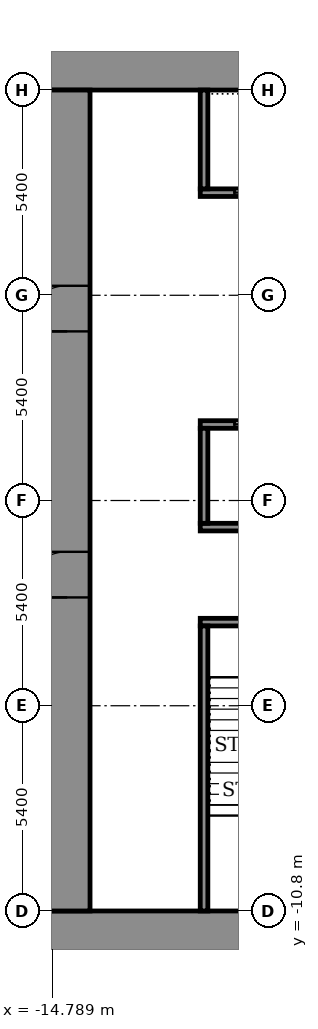
"""IFC4 building model, lengths in metres.
Left out: names, types, materials, properties, quantities, classifications, styles, units other than length and angle.
Written with IfcOpenShell. Run it as: python <this file> out.ifc"""

import sys

from ifc_helpers import new_model, si_unit, direction, frame, frame_2d, origin, place, context, subcontext, project, spatial, rectangle, extrude, element, fill, save


model = new_model("IFC4")
c1 = context("Model", 3, precision=1e-05, world=origin(), true_north=direction((0.0, 1.0)))
c2 = subcontext(c1, "Body", "Model", "MODEL_VIEW")
j1 = project(units=[si_unit("LENGTHUNIT", "METRE"), si_unit("PLANEANGLEUNIT", "RADIAN")], contexts=[c1])
p1 = place(None, origin())
s1 = spatial("IfcSite", under=j1, at=p1, CompositionType="ELEMENT")
p2 = place(p1, origin())
s2 = spatial("IfcBuilding", under=s1, at=p2, CompositionType="ELEMENT")
p3 = place(p2, frame((0.0, 0.0, 20.5)))
s3 = spatial("IfcBuildingStorey", under=s2, at=p3, CompositionType="ELEMENT", Elevation=20.5)
for number, where, z_axis, x_axis in (
    (1, (-15.0, -11.4, 0.0), (0.0, 0.0, 1.0), (1.0, 0.0, 0.0)),
    (2, (-15.0, 11.4, 0.0), (0.0, 0.0, 1.0), (1.0, 0.0, 0.0)),
):
    element("IfcWall", number, at=place(p3, frame(where, z_axis=z_axis, x_axis=x_axis)), inside=s3, PredefinedType="SHEAR", context=c2, shape_type="SweptSolid", body=[
        extrude(rectangle(XDim=30.0, YDim=1.2, at=frame_2d((15.0, 0.0))), origin(), (0.0, 0.0, 1.0), 4.5),
    ])
p4 = place(p3, frame((-14.4, -10.8, 0.0), z_axis=(0.0, 0.0, 1.0), x_axis=(0.0, 1.0, 0.0)))
e3 = element("IfcWall", 3, at=p4, inside=s3, PredefinedType="SHEAR", context=c2, shape_type="SweptSolid", body=[
    extrude(rectangle(XDim=21.6, YDim=1.2, at=frame_2d((10.8, 0.0))), origin(), (0.0, 0.0, 1.0), 4.5),
])
p5 = place(p4, frame((8.25, 0.0, 0.0)))
e4 = element("IfcOpeningElement", 4, at=p5, cuts=e3, PredefinedType="OPENING", context=c2, shape_type="SweptSolid", body=[
    extrude(rectangle(XDim=1.2, YDim=2.1, at=frame_2d((0.6, 1.05))), frame((0.0, 0.61, 0.0), z_axis=(0.0, -1.0, 0.0), x_axis=(1.0, 0.0, 0.0)), (0.0, 0.0, 1.0), 1.22),
])
p6 = place(p4, frame((15.25, 0.0, 0.0)))
e5 = element("IfcOpeningElement", 5, at=p6, cuts=e3, PredefinedType="OPENING", context=c2, shape_type="SweptSolid", body=[
    extrude(rectangle(XDim=1.2, YDim=2.1, at=frame_2d((0.6, 1.05))), frame((0.0, 0.61, 0.0), z_axis=(0.0, -1.0, 0.0), x_axis=(1.0, 0.0, 0.0)), (0.0, 0.0, 1.0), 1.22),
])
p7 = place(p3, frame((-10.9, -3.2, 0.0), z_axis=(0.0, 0.0, 1.0), x_axis=(1.0, 0.0, 0.0)))
e6 = element("IfcWall", 6, at=p7, inside=s3, PredefinedType="SHEAR", context=c2, shape_type="SweptSolid", body=[
    extrude(rectangle(XDim=21.8, YDim=0.2, at=frame_2d((10.9, 0.0))), origin(), (0.0, 0.0, 1.0), 3.95),
])
p8 = place(p7, frame((1.075, 0.0, 0.0)))
e7 = element("IfcOpeningElement", 7, at=p8, cuts=e6, PredefinedType="OPENING", context=c2, shape_type="SweptSolid", body=[
    extrude(rectangle(XDim=1.1, YDim=2.1, at=frame_2d((0.55, 1.05))), frame((0.0, 0.11, 0.0), z_axis=(0.0, -1.0, 0.0), x_axis=(1.0, 0.0, 0.0)), (0.0, 0.0, 1.0), 0.22),
])
p9 = place(p7, frame((10.325, 0.0, 0.0)))
e8 = element("IfcOpeningElement", 8, at=p9, cuts=e6, PredefinedType="OPENING", context=c2, shape_type="SweptSolid", body=[
    extrude(rectangle(XDim=1.1, YDim=2.1, at=frame_2d((0.55, 1.05))), frame((0.0, 0.11, 0.0), z_axis=(0.0, -1.0, 0.0), x_axis=(1.0, 0.0, 0.0)), (0.0, 0.0, 1.0), 0.22),
])
p10 = place(p7, frame((19.625, 0.0, 0.0)))
e9 = element("IfcOpeningElement", 9, at=p10, cuts=e6, PredefinedType="OPENING", context=c2, shape_type="SweptSolid", body=[
    extrude(rectangle(XDim=1.1, YDim=2.1, at=frame_2d((0.55, 1.05))), frame((0.0, 0.11, 0.0), z_axis=(0.0, -1.0, 0.0), x_axis=(1.0, 0.0, 0.0)), (0.0, 0.0, 1.0), 0.22),
])
p11 = place(p7, frame((5.7, 0.0, 0.0)))
e10 = element("IfcOpeningElement", 10, at=p11, cuts=e6, PredefinedType="OPENING", context=c2, shape_type="SweptSolid", body=[
    extrude(rectangle(XDim=1.1, YDim=2.1, at=frame_2d((0.55, 1.05))), frame((0.0, 0.11, 0.0), z_axis=(0.0, -1.0, 0.0), x_axis=(1.0, 0.0, 0.0)), (0.0, 0.0, 1.0), 0.22),
])
p12 = place(p7, frame((14.975, 0.0, 0.0)))
e11 = element("IfcOpeningElement", 11, at=p12, cuts=e6, PredefinedType="OPENING", context=c2, shape_type="SweptSolid", body=[
    extrude(rectangle(XDim=1.1, YDim=2.1, at=frame_2d((0.55, 1.05))), frame((0.0, 0.11, 0.0), z_axis=(0.0, -1.0, 0.0), x_axis=(1.0, 0.0, 0.0)), (0.0, 0.0, 1.0), 0.22),
])
p13 = place(p3, frame((-10.9, -0.7, 0.0), z_axis=(0.0, 0.0, 1.0), x_axis=(1.0, 0.0, 0.0)))
e12 = element("IfcWall", 12, at=p13, inside=s3, PredefinedType="SHEAR", context=c2, shape_type="SweptSolid", body=[
    extrude(rectangle(XDim=21.8, YDim=0.2, at=frame_2d((10.9, 0.0))), origin(), (0.0, 0.0, 1.0), 3.95),
])
p14 = place(p3, frame((-10.9, 2.0, 0.0), z_axis=(0.0, 0.0, 1.0), x_axis=(1.0, 0.0, 0.0)))
e13 = element("IfcWall", 13, at=p14, inside=s3, PredefinedType="SHEAR", context=c2, shape_type="SweptSolid", body=[
    extrude(rectangle(XDim=21.8, YDim=0.2, at=frame_2d((10.9, 0.0))), origin(), (0.0, 0.0, 1.0), 3.95),
])
p15 = place(p14, frame((0.9, 0.0, 0.0)))
e14 = element("IfcOpeningElement", 14, at=p15, cuts=e13, PredefinedType="OPENING", context=c2, shape_type="SweptSolid", body=[
    extrude(rectangle(XDim=1.1, YDim=2.1, at=frame_2d((0.55, 1.05))), frame((0.0, 0.11, 0.0), z_axis=(0.0, -1.0, 0.0), x_axis=(1.0, 0.0, 0.0)), (0.0, 0.0, 1.0), 0.22),
])
p16 = place(p14, frame((3.6, 0.0, 0.0)))
e15 = element("IfcOpeningElement", 15, at=p16, cuts=e13, PredefinedType="OPENING", context=c2, shape_type="SweptSolid", body=[
    extrude(rectangle(XDim=1.1, YDim=2.1, at=frame_2d((0.55, 1.05))), frame((0.0, 0.11, 0.0), z_axis=(0.0, -1.0, 0.0), x_axis=(1.0, 0.0, 0.0)), (0.0, 0.0, 1.0), 0.22),
])
p17 = place(p14, frame((6.3, 0.0, 0.0)))
e16 = element("IfcOpeningElement", 16, at=p17, cuts=e13, PredefinedType="OPENING", context=c2, shape_type="SweptSolid", body=[
    extrude(rectangle(XDim=1.1, YDim=2.1, at=frame_2d((0.55, 1.05))), frame((0.0, 0.11, 0.0), z_axis=(0.0, -1.0, 0.0), x_axis=(1.0, 0.0, 0.0)), (0.0, 0.0, 1.0), 0.22),
])
p18 = place(p14, frame((9.0, 0.0, 0.0)))
e17 = element("IfcOpeningElement", 17, at=p18, cuts=e13, PredefinedType="OPENING", context=c2, shape_type="SweptSolid", body=[
    extrude(rectangle(XDim=1.1, YDim=2.1, at=frame_2d((0.55, 1.05))), frame((0.0, 0.11, 0.0), z_axis=(0.0, -1.0, 0.0), x_axis=(1.0, 0.0, 0.0)), (0.0, 0.0, 1.0), 0.22),
])
p19 = place(p14, frame((11.7, 0.0, 0.0)))
e18 = element("IfcOpeningElement", 18, at=p19, cuts=e13, PredefinedType="OPENING", context=c2, shape_type="SweptSolid", body=[
    extrude(rectangle(XDim=1.1, YDim=2.1, at=frame_2d((0.55, 1.05))), frame((0.0, 0.11, 0.0), z_axis=(0.0, -1.0, 0.0), x_axis=(1.0, 0.0, 0.0)), (0.0, 0.0, 1.0), 0.22),
])
p20 = place(p14, frame((17.2, 0.0, 0.0)))
e19 = element("IfcOpeningElement", 19, at=p20, cuts=e13, PredefinedType="OPENING", context=c2, shape_type="SweptSolid", body=[
    extrude(rectangle(XDim=0.9, YDim=2.1, at=frame_2d((0.45, 1.05))), frame((0.0, 0.11, 0.0), z_axis=(0.0, -1.0, 0.0), x_axis=(1.0, 0.0, 0.0)), (0.0, 0.0, 1.0), 0.22),
])
p21 = place(p3, frame((-10.9, 8.1, 0.0), z_axis=(0.0, 0.0, 1.0), x_axis=(1.0, 0.0, 0.0)))
e20 = element("IfcWall", 20, at=p21, inside=s3, PredefinedType="SHEAR", context=c2, shape_type="SweptSolid", body=[
    extrude(rectangle(XDim=21.8, YDim=0.2, at=frame_2d((10.9, 0.0))), origin(), (0.0, 0.0, 1.0), 3.95),
])
p22 = place(p21, frame((0.9, 0.0, 0.0)))
e21 = element("IfcOpeningElement", 21, at=p22, cuts=e20, PredefinedType="OPENING", context=c2, shape_type="SweptSolid", body=[
    extrude(rectangle(XDim=1.1, YDim=2.1, at=frame_2d((0.55, 1.05))), frame((0.0, 0.11, 0.0), z_axis=(0.0, -1.0, 0.0), x_axis=(1.0, 0.0, 0.0)), (0.0, 0.0, 1.0), 0.22),
])
p23 = place(p21, frame((3.6, 0.0, 0.0)))
e22 = element("IfcOpeningElement", 22, at=p23, cuts=e20, PredefinedType="OPENING", context=c2, shape_type="SweptSolid", body=[
    extrude(rectangle(XDim=1.1, YDim=2.1, at=frame_2d((0.55, 1.05))), frame((0.0, 0.11, 0.0), z_axis=(0.0, -1.0, 0.0), x_axis=(1.0, 0.0, 0.0)), (0.0, 0.0, 1.0), 0.22),
])
p24 = place(p21, frame((6.3, 0.0, 0.0)))
e23 = element("IfcOpeningElement", 23, at=p24, cuts=e20, PredefinedType="OPENING", context=c2, shape_type="SweptSolid", body=[
    extrude(rectangle(XDim=1.1, YDim=2.1, at=frame_2d((0.55, 1.05))), frame((0.0, 0.11, 0.0), z_axis=(0.0, -1.0, 0.0), x_axis=(1.0, 0.0, 0.0)), (0.0, 0.0, 1.0), 0.22),
])
p25 = place(p21, frame((9.0, 0.0, 0.0)))
e24 = element("IfcOpeningElement", 24, at=p25, cuts=e20, PredefinedType="OPENING", context=c2, shape_type="SweptSolid", body=[
    extrude(rectangle(XDim=1.1, YDim=2.1, at=frame_2d((0.55, 1.05))), frame((0.0, 0.11, 0.0), z_axis=(0.0, -1.0, 0.0), x_axis=(1.0, 0.0, 0.0)), (0.0, 0.0, 1.0), 0.22),
])
p26 = place(p21, frame((11.7, 0.0, 0.0)))
e25 = element("IfcOpeningElement", 25, at=p26, cuts=e20, PredefinedType="OPENING", context=c2, shape_type="SweptSolid", body=[
    extrude(rectangle(XDim=1.1, YDim=2.1, at=frame_2d((0.55, 1.05))), frame((0.0, 0.11, 0.0), z_axis=(0.0, -1.0, 0.0), x_axis=(1.0, 0.0, 0.0)), (0.0, 0.0, 1.0), 0.22),
])
p27 = place(p21, frame((14.5, 0.0, 0.0)))
e26 = element("IfcOpeningElement", 26, at=p27, cuts=e20, PredefinedType="OPENING", context=c2, shape_type="SweptSolid", body=[
    extrude(rectangle(XDim=0.9, YDim=2.1, at=frame_2d((0.45, 1.05))), frame((0.0, 0.11, 0.0), z_axis=(0.0, -1.0, 0.0), x_axis=(1.0, 0.0, 0.0)), (0.0, 0.0, 1.0), 0.22),
])
p28 = place(p21, frame((18.55, 0.0, 0.0)))
e27 = element("IfcOpeningElement", 27, at=p28, cuts=e20, PredefinedType="OPENING", context=c2, shape_type="SweptSolid", body=[
    extrude(rectangle(XDim=0.9, YDim=2.1, at=frame_2d((0.45, 1.05))), frame((0.0, 0.11, 0.0), z_axis=(0.0, -1.0, 0.0), x_axis=(1.0, 0.0, 0.0)), (0.0, 0.0, 1.0), 0.22),
])
p29 = place(p3, frame((-10.8, -10.8, 0.0), z_axis=(0.0, 0.0, 1.0), x_axis=(0.0, 1.0, 0.0)))
e28 = element("IfcWall", 28, at=p29, inside=s3, PredefinedType="SHEAR", context=c2, shape_type="SweptSolid", body=[
    extrude(rectangle(XDim=7.5, YDim=0.2, at=frame_2d((3.75, 0.0))), origin(), (0.0, 0.0, 1.0), 3.95),
])
p30 = place(p3, frame((-10.8, -0.6, 0.0), z_axis=(0.0, 0.0, 1.0), x_axis=(0.0, 1.0, 0.0)))
e29 = element("IfcWall", 29, at=p30, inside=s3, PredefinedType="SHEAR", context=c2, shape_type="SweptSolid", body=[
    extrude(rectangle(XDim=2.5, YDim=0.2, at=frame_2d((1.25, 0.0))), origin(), (0.0, 0.0, 1.0), 3.95),
])
p31 = place(p3, frame((-10.8, 8.2, 0.0), z_axis=(0.0, 0.0, 1.0), x_axis=(0.0, 1.0, 0.0)))
e30 = element("IfcWall", 30, at=p31, inside=s3, PredefinedType="SHEAR", context=c2, shape_type="SweptSolid", body=[
    extrude(rectangle(XDim=2.6, YDim=0.2, at=frame_2d((1.3, 0.0))), origin(), (0.0, 0.0, 1.0), 3.95),
])
p32 = place(p5, origin())
e31 = element("IfcDoor", 31, at=p32, inside=s3, OperationType="DOUBLE_DOOR_SINGLE_SWING", PredefinedType="DOOR", context=c2, shape_type="SweptSolid", body=[
    extrude(rectangle(XDim=1.2, YDim=2.1, at=frame_2d((0.6, 1.05))), frame((0.0, 0.025, 0.0), z_axis=(0.0, -1.0, 0.0), x_axis=(1.0, 0.0, 0.0)), (0.0, 0.0, 1.0), 0.05),
])
fill(e4, e31)
p33 = place(p6, origin())
e32 = element("IfcDoor", 32, at=p33, inside=s3, OperationType="DOUBLE_DOOR_SINGLE_SWING", PredefinedType="DOOR", context=c2, shape_type="SweptSolid", body=[
    extrude(rectangle(XDim=1.2, YDim=2.1, at=frame_2d((0.6, 1.05))), frame((0.0, 0.025, 0.0), z_axis=(0.0, -1.0, 0.0), x_axis=(1.0, 0.0, 0.0)), (0.0, 0.0, 1.0), 0.05),
])
fill(e5, e32)
p34 = place(p15, origin())
e33 = element("IfcDoor", 33, at=p34, inside=s3, OperationType="SLIDING_TO_LEFT", PredefinedType="DOOR", context=c2, shape_type="SweptSolid", body=[
    extrude(rectangle(XDim=1.1, YDim=2.1, at=frame_2d((0.55, 1.05))), frame((0.0, 0.025, 0.0), z_axis=(0.0, -1.0, 0.0), x_axis=(1.0, 0.0, 0.0)), (0.0, 0.0, 1.0), 0.05),
])
fill(e14, e33)
p35 = place(p22, origin())
e34 = element("IfcDoor", 34, at=p35, inside=s3, OperationType="SLIDING_TO_LEFT", PredefinedType="DOOR", context=c2, shape_type="SweptSolid", body=[
    extrude(rectangle(XDim=1.1, YDim=2.1, at=frame_2d((0.55, 1.05))), frame((0.0, 0.025, 0.0), z_axis=(0.0, -1.0, 0.0), x_axis=(1.0, 0.0, 0.0)), (0.0, 0.0, 1.0), 0.05),
])
fill(e21, e34)
save(model, sys.argv[1])
